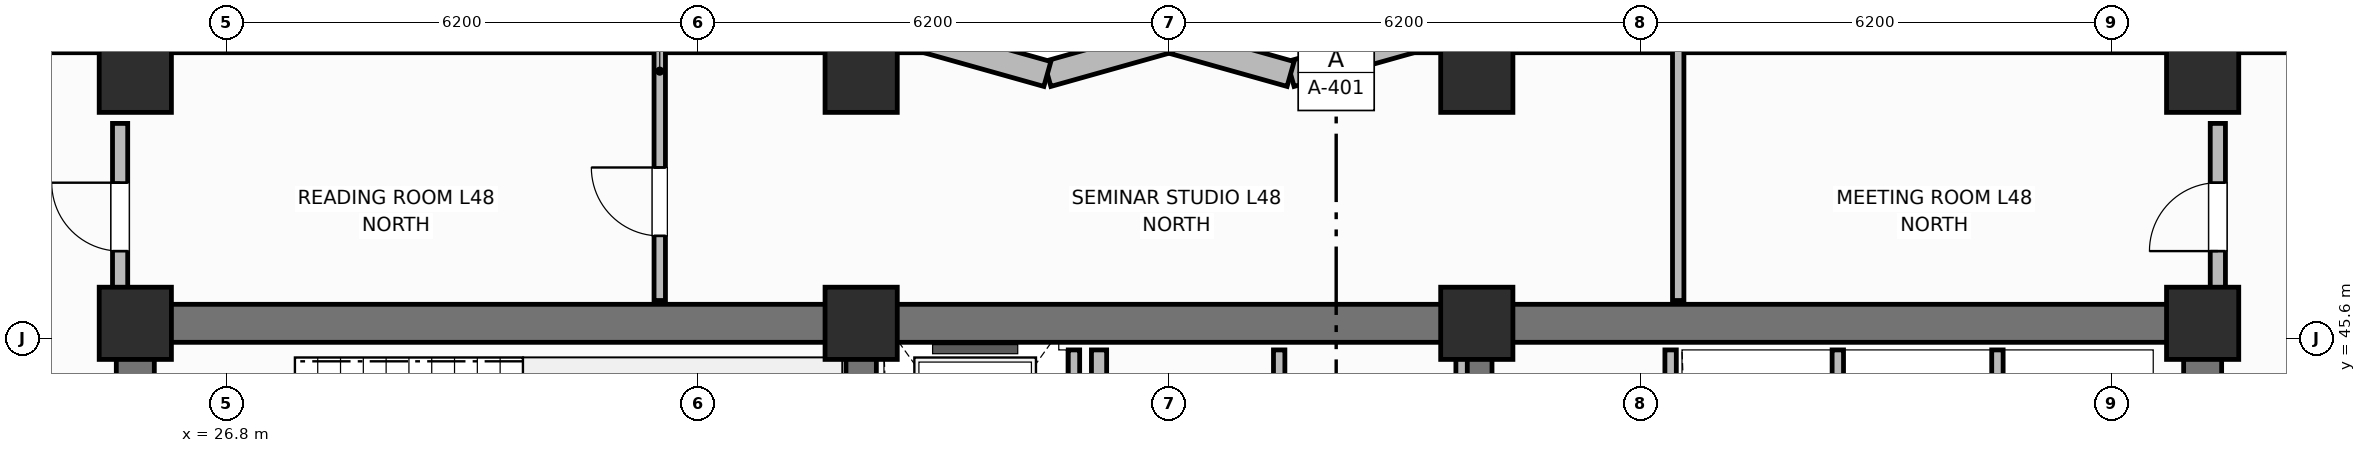
"""IFC4 building model, lengths in metres.
Left out: names, types, materials, properties, quantities, classifications, styles, units other than length and angle.
Written with IfcOpenShell. Run it as: python <this file> out.ifc"""

import sys

from ifc_helpers import new_model, si_unit, direction, frame, frame_2d, origin, origin_2d, place, context, subcontext, project, spatial, rectangle, extrude, element, fill, save


model = new_model("IFC4")
c1 = context("Model", 3, precision=1e-05, world=origin(), true_north=direction((0.0, 1.0)))
c2 = subcontext(c1, "Body", "Model", "MODEL_VIEW")
j1 = project(units=[si_unit("LENGTHUNIT", "METRE"), si_unit("PLANEANGLEUNIT", "RADIAN")], contexts=[c1])
p1 = place(None, origin())
s1 = spatial("IfcSite", under=j1, at=p1, CompositionType="ELEMENT")
p2 = place(p1, origin())
s2 = spatial("IfcBuilding", under=s1, at=p2, CompositionType="ELEMENT")
p3 = place(p2, frame((0.0, 0.0, 192.2)))
s3 = spatial("IfcBuildingStorey", under=s2, at=p3, CompositionType="ELEMENT", Elevation=192.2)
p4 = place(p3, frame((25.6, 45.8, 0.0), z_axis=(0.0, 0.0, 1.0), x_axis=(1.0, 0.0, 0.0)))
e1 = element("IfcWall", 1, at=p4, inside=s3, PredefinedType="SHEAR", context=c2, shape_type="SweptSolid", body=[
    extrude(rectangle(XDim=27.2, YDim=0.5, at=frame_2d((13.6, 0.0))), origin(), (0.0, 0.0, 1.0), 3.7),
])
for number, where, z_axis, x_axis in (
    (2, (25.6, 39.85, 0.0), (0.0, 0.0, 1.0), (0.0, 1.0, 0.0)),
    (3, (52.8, 39.85, 0.0), (0.0, 0.0, 1.0), (0.0, 1.0, 0.0)),
):
    element("IfcWall", number, at=place(p3, frame(where, z_axis=z_axis, x_axis=x_axis)), inside=s3, PredefinedType="SHEAR", context=c2, shape_type="SweptSolid", body=[
        extrude(rectangle(XDim=5.7, YDim=0.5, at=frame_2d((2.85, 0.0))), origin(), (0.0, 0.0, 1.0), 3.7),
    ])
for number, where, z_axis, x_axis in (
    (4, (35.15, 39.85, 0.0), (0.0, 0.0, 1.0), (0.0, 1.0, 0.0)),
    (5, (43.25, 39.85, 0.0), (0.0, 0.0, 1.0), (0.0, 1.0, 0.0)),
):
    element("IfcWall", number, at=place(p3, frame(where, z_axis=z_axis, x_axis=x_axis)), inside=s3, PredefinedType="SHEAR", context=c2, shape_type="SweptSolid", body=[
        extrude(rectangle(XDim=5.7, YDim=0.4, at=frame_2d((2.85, 0.0))), origin(), (0.0, 0.0, 1.0), 3.7),
    ])
for number, where, z_axis, x_axis in (
    (6, (25.6, 45.8, 0.0), (0.0, 0.0, 1.0), (1.0, 0.0, 0.0)),
    (7, (35.15, 45.8, 0.0), (0.0, 0.0, 1.0), (1.0, 0.0, 0.0)),
    (8, (43.25, 45.8, 0.0), (0.0, 0.0, 1.0), (1.0, 0.0, 0.0)),
    (9, (52.8, 45.8, 0.0), (0.0, 0.0, 1.0), (1.0, 0.0, 0.0)),
    (10, (25.6, 49.05, 0.0), (0.0, 0.0, 1.0), (1.0, 0.0, 0.0)),
    (11, (35.15, 49.05, 0.0), (0.0, 0.0, 1.0), (1.0, 0.0, 0.0)),
    (12, (43.25, 49.05, 0.0), (0.0, 0.0, 1.0), (1.0, 0.0, 0.0)),
    (13, (52.8, 49.05, 0.0), (0.0, 0.0, 1.0), (1.0, 0.0, 0.0)),
):
    element("IfcColumn", number, at=place(p3, frame(where, z_axis=z_axis, x_axis=x_axis)), inside=s3, PredefinedType="COLUMN", context=c2, shape_type="SweptSolid", body=[
        extrude(rectangle(XDim=0.95, YDim=0.95, at=origin_2d()), origin(), (0.0, 0.0, 1.0), 3.7),
    ])
p5 = place(p3, frame((58.2, 49.53, 0.0), z_axis=(0.0, 0.0, 1.0), x_axis=(-1.0, 0.0, 0.0)))
e14 = element("IfcWall", 14, at=p5, inside=s3, PredefinedType="SOLIDWALL", context=c2, shape_type="SweptSolid", body=[
    extrude(rectangle(XDim=15.8, YDim=0.34, at=frame_2d((7.9, 0.0))), origin(), (0.0, 0.0, 1.0), 2.66),
])
p6 = place(p5, frame((8.913, 0.0, 0.64)))
e15 = element("IfcOpeningElement", 15, at=p6, cuts=e14, PredefinedType="OPENING", context=c2, shape_type="SweptSolid", body=[
    extrude(rectangle(XDim=1.6, YDim=1.9, at=frame_2d((0.8, 0.95))), frame((0.0, 0.18, 0.0), z_axis=(0.0, -1.0, 0.0), x_axis=(1.0, 0.0, 0.0)), (0.0, 0.0, 1.0), 0.36),
])
p7 = place(p3, frame((42.4, 49.53, 0.0), z_axis=(0.0, 0.0, 1.0), x_axis=(-0.962652136636, -0.270741322725, 0.0)))
e16 = element("IfcWall", 16, at=p7, inside=s3, PredefinedType="SOLIDWALL", context=c2, shape_type="SweptSolid", body=[
    extrude(rectangle(XDim=1.662, YDim=0.34, at=frame_2d((0.831, 0.0))), origin(), (0.0, 0.0, 1.0), 2.66),
])
p8 = place(p3, frame((40.8, 49.08, 0.0), z_axis=(0.0, 0.0, 1.0), x_axis=(-0.962662902433, 0.270703040766, 0.0)))
e17 = element("IfcWall", 17, at=p8, inside=s3, PredefinedType="SOLIDWALL", context=c2, shape_type="SweptSolid", body=[
    extrude(rectangle(XDim=1.662, YDim=0.34, at=frame_2d((0.831, 0.0))), origin(), (0.0, 0.0, 1.0), 2.66),
])
p9 = place(p3, frame((39.2, 49.53, 0.0), z_axis=(0.0, 0.0, 1.0), x_axis=(-0.962652136636, -0.270741322725, 0.0)))
e18 = element("IfcWall", 18, at=p9, inside=s3, PredefinedType="SOLIDWALL", context=c2, shape_type="SweptSolid", body=[
    extrude(rectangle(XDim=1.662, YDim=0.34, at=frame_2d((0.831, 0.0))), origin(), (0.0, 0.0, 1.0), 2.66),
])
p10 = place(p3, frame((37.6, 49.08, 0.0), z_axis=(0.0, 0.0, 1.0), x_axis=(-0.962662902433, 0.270703040766, 0.0)))
e19 = element("IfcWall", 19, at=p10, inside=s3, PredefinedType="SOLIDWALL", context=c2, shape_type="SweptSolid", body=[
    extrude(rectangle(XDim=1.662, YDim=0.34, at=frame_2d((0.831, 0.0))), origin(), (0.0, 0.0, 1.0), 2.66),
])
p11 = place(p3, frame((36.0, 49.53, 0.0), z_axis=(0.0, 0.0, 1.0), x_axis=(-1.0, 0.0, 0.0)))
e20 = element("IfcWall", 20, at=p11, inside=s3, PredefinedType="SOLIDWALL", context=c2, shape_type="SweptSolid", body=[
    extrude(rectangle(XDim=15.8, YDim=0.34, at=frame_2d((7.9, 0.0))), origin(), (0.0, 0.0, 1.0), 2.66),
])
p12 = place(p11, frame((5.288, 0.0, 0.64)))
e21 = element("IfcOpeningElement", 21, at=p12, cuts=e20, PredefinedType="OPENING", context=c2, shape_type="SweptSolid", body=[
    extrude(rectangle(XDim=1.6, YDim=1.9, at=frame_2d((0.8, 0.95))), frame((0.0, 0.18, 0.0), z_axis=(0.0, -1.0, 0.0), x_axis=(1.0, 0.0, 0.0)), (0.0, 0.0, 1.0), 0.36),
])
p13 = place(p11, frame((12.887, 0.0, 0.64)))
e22 = element("IfcOpeningElement", 22, at=p13, cuts=e20, PredefinedType="OPENING", context=c2, shape_type="SweptSolid", body=[
    extrude(rectangle(XDim=1.6, YDim=1.9, at=frame_2d((0.8, 0.95))), frame((0.0, 0.18, 0.0), z_axis=(0.0, -1.0, 0.0), x_axis=(1.0, 0.0, 0.0)), (0.0, 0.0, 1.0), 0.36),
])
p14 = place(p3, frame((37.95, 42.6, 0.0), z_axis=(0.0, 0.0, 1.0), x_axis=(0.0, 1.0, 0.0)))
e23 = element("IfcWall", 23, at=p14, inside=s3, PredefinedType="PARTITIONING", context=c2, shape_type="SweptSolid", body=[
    extrude(rectangle(XDim=2.85, YDim=0.15, at=frame_2d((1.425, 0.0))), origin(), (0.0, 0.0, 1.0), 2.49),
])
p15 = place(p3, frame((38.28, 39.82, 0.0), z_axis=(0.0, 0.0, 1.0), x_axis=(0.0, 1.0, 0.0)))
e24 = element("IfcWall", 24, at=p15, inside=s3, PredefinedType="PARTITIONING", context=c2, shape_type="SweptSolid", body=[
    extrude(rectangle(XDim=5.63, YDim=0.2, at=frame_2d((2.815, 0.0))), origin(), (0.0, 0.0, 1.0), 2.49),
])
for number, where, z_axis, x_axis in (
    (25, (43.05, 39.82, 0.0), (0.0, 0.0, 1.0), (0.0, 1.0, 0.0)),
    (26, (40.65, 39.82, 0.0), (0.0, 0.0, 1.0), (0.0, 1.0, 0.0)),
    (27, (45.8, 39.82, 0.0), (0.0, 0.0, 1.0), (0.0, 1.0, 0.0)),
):
    element("IfcWall", number, at=place(p3, frame(where, z_axis=z_axis, x_axis=x_axis)), inside=s3, PredefinedType="PARTITIONING", context=c2, shape_type="SweptSolid", body=[
        extrude(rectangle(XDim=5.63, YDim=0.15, at=frame_2d((2.815, 0.0))), origin(), (0.0, 0.0, 1.0), 2.49),
    ])
for number, where, z_axis, x_axis in (
    (28, (48.0, 42.65, 0.0), (0.0, 0.0, 1.0), (0.0, 1.0, 0.0)),
    (29, (50.1, 42.65, 0.0), (0.0, 0.0, 1.0), (0.0, 1.0, 0.0)),
):
    element("IfcWall", number, at=place(p3, frame(where, z_axis=z_axis, x_axis=x_axis)), inside=s3, PredefinedType="PARTITIONING", context=c2, shape_type="SweptSolid", body=[
        extrude(rectangle(XDim=2.8, YDim=0.15, at=frame_2d((1.4, 0.0))), origin(), (0.0, 0.0, 1.0), 2.49),
    ])
p16 = place(p3, frame((32.5, 46.1, 0.0), z_axis=(0.0, 0.0, 1.0), x_axis=(0.0, 1.0, 0.0)))
e30 = element("IfcWall", 30, at=p16, inside=s3, PredefinedType="PARTITIONING", context=c2, shape_type="SweptSolid", body=[
    extrude(rectangle(XDim=3.43, YDim=0.15, at=frame_2d((1.715, 0.0))), origin(), (0.0, 0.0, 1.0), 2.49),
])
p17 = place(p16, frame((0.85, 0.0, 0.0)))
e31 = element("IfcOpeningElement", 31, at=p17, cuts=e30, PredefinedType="OPENING", context=c2, shape_type="SweptSolid", body=[
    extrude(rectangle(XDim=0.9, YDim=2.1, at=frame_2d((0.45, 1.05))), frame((0.0, 0.085, 0.0), z_axis=(0.0, -1.0, 0.0), x_axis=(1.0, 0.0, 0.0)), (0.0, 0.0, 1.0), 0.17),
])
p18 = place(p3, frame((45.9, 46.1, 0.0), z_axis=(0.0, 0.0, 1.0), x_axis=(0.0, 1.0, 0.0)))
e32 = element("IfcWall", 32, at=p18, inside=s3, PredefinedType="PARTITIONING", context=c2, shape_type="SweptSolid", body=[
    extrude(rectangle(XDim=3.43, YDim=0.15, at=frame_2d((1.715, 0.0))), origin(), (0.0, 0.0, 1.0), 2.49),
])
p19 = place(p3, frame((25.4, 46.1, 0.0), z_axis=(0.0, 0.0, 1.0), x_axis=(0.0, 1.0, 0.0)))
e33 = element("IfcWall", 33, at=p19, inside=s3, PredefinedType="PARTITIONING", context=c2, shape_type="SweptSolid", body=[
    extrude(rectangle(XDim=2.33, YDim=0.2, at=frame_2d((1.165, 0.0))), origin(), (0.0, 0.0, 1.0), 2.49),
])
p20 = place(p19, frame((0.65, 0.0, 0.0)))
e34 = element("IfcOpeningElement", 34, at=p20, cuts=e33, PredefinedType="OPENING", context=c2, shape_type="SweptSolid", body=[
    extrude(rectangle(XDim=0.9, YDim=2.1, at=frame_2d((0.45, 1.05))), frame((0.0, 0.11, 0.0), z_axis=(0.0, -1.0, 0.0), x_axis=(1.0, 0.0, 0.0)), (0.0, 0.0, 1.0), 0.22),
])
p21 = place(p3, frame((53.0, 46.1, 0.0), z_axis=(0.0, 0.0, 1.0), x_axis=(0.0, 1.0, 0.0)))
e35 = element("IfcWall", 35, at=p21, inside=s3, PredefinedType="PARTITIONING", context=c2, shape_type="SweptSolid", body=[
    extrude(rectangle(XDim=2.33, YDim=0.2, at=frame_2d((1.165, 0.0))), origin(), (0.0, 0.0, 1.0), 2.49),
])
p22 = place(p21, frame((0.65, 0.0, 0.0)))
e36 = element("IfcOpeningElement", 36, at=p22, cuts=e35, PredefinedType="OPENING", context=c2, shape_type="SweptSolid", body=[
    extrude(rectangle(XDim=0.9, YDim=2.1, at=frame_2d((0.45, 1.05))), frame((0.0, 0.11, 0.0), z_axis=(0.0, -1.0, 0.0), x_axis=(1.0, 0.0, 0.0)), (0.0, 0.0, 1.0), 0.22),
])
p23 = place(p17, origin())
e37 = element("IfcDoor", 37, at=p23, inside=s3, OperationType="SINGLE_SWING_RIGHT", PredefinedType="DOOR", context=c2, shape_type="SweptSolid", body=[
    extrude(rectangle(XDim=0.9, YDim=2.1, at=frame_2d((0.45, 1.05))), frame((0.0, 0.025, 0.0), z_axis=(0.0, -1.0, 0.0), x_axis=(1.0, 0.0, 0.0)), (0.0, 0.0, 1.0), 0.05),
])
fill(e31, e37)
p24 = place(p20, origin())
e38 = element("IfcDoor", 38, at=p24, inside=s3, OperationType="SINGLE_SWING_RIGHT", PredefinedType="DOOR", context=c2, shape_type="SweptSolid", body=[
    extrude(rectangle(XDim=0.9, YDim=2.1, at=frame_2d((0.45, 1.05))), frame((0.0, 0.025, 0.0), z_axis=(0.0, -1.0, 0.0), x_axis=(1.0, 0.0, 0.0)), (0.0, 0.0, 1.0), 0.05),
])
fill(e34, e38)
p25 = place(p22, origin())
e39 = element("IfcDoor", 39, at=p25, inside=s3, OperationType="SINGLE_SWING_LEFT", PredefinedType="DOOR", context=c2, shape_type="SweptSolid", body=[
    extrude(rectangle(XDim=0.9, YDim=2.1, at=frame_2d((0.45, 1.05))), frame((0.0, 0.025, 0.0), z_axis=(0.0, -1.0, 0.0), x_axis=(1.0, 0.0, 0.0)), (0.0, 0.0, 1.0), 0.05),
])
fill(e36, e39)
save(model, sys.argv[1])
